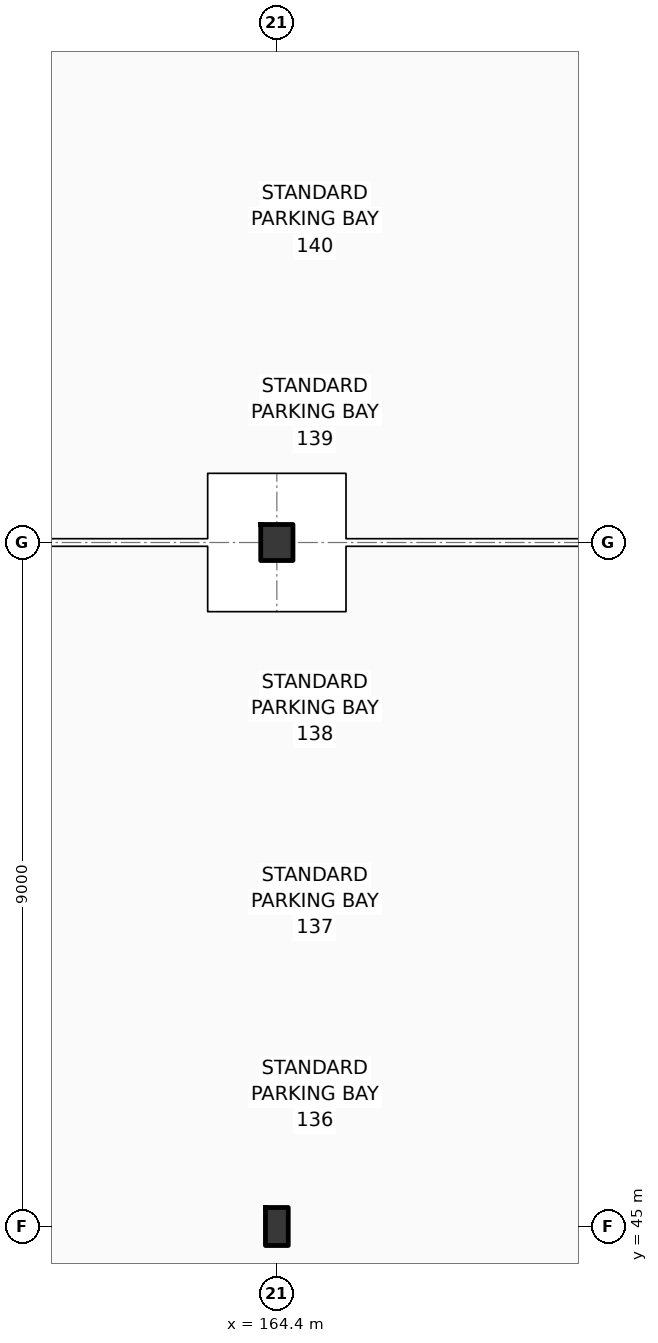
"""IFC4 building model, lengths in metres.
Left out: names, types, materials, properties, quantities, classifications, styles, units other than length and angle.
Written with IfcOpenShell. Run it as: python <this file> out.ifc"""

import sys

from ifc_helpers import new_model, si_unit, direction, frame, origin, origin_2d, place, context, subcontext, project, spatial, i_section, extrude, element, save


model = new_model("IFC4")
c1 = context("Model", 3, precision=1e-05, world=origin(), true_north=direction((0.0, 1.0)))
c2 = subcontext(c1, "Body", "Model", "MODEL_VIEW")
j1 = project(units=[si_unit("LENGTHUNIT", "METRE"), si_unit("PLANEANGLEUNIT", "RADIAN")], contexts=[c1])
p1 = place(None, origin())
s1 = spatial("IfcSite", under=j1, at=p1, CompositionType="ELEMENT")
p2 = place(p1, origin())
s2 = spatial("IfcBuilding", under=s1, at=p2, CompositionType="ELEMENT")
p3 = place(p2, frame((0.0, 0.0, -4.5)))
s3 = spatial("IfcBuildingStorey", under=s2, at=p3, CompositionType="ELEMENT", Elevation=-4.5)
p4 = place(p3, frame((164.4, 54.0, 0.0), z_axis=(0.0, 0.0, 1.0), x_axis=(1.0, 0.0, 0.0)))
e1 = element("IfcColumn", 1, at=p4, inside=s3, PredefinedType="COLUMN", context=c2, shape_type="SweptSolid", body=[
    extrude(i_section(OverallWidth=0.424, OverallDepth=0.474, WebThickness=0.045, FlangeThickness=0.055, FilletRadius=0.015, at=origin_2d()), origin(), (0.0, 0.0, 1.0), 4.5),
])
p5 = place(p3, frame((164.4, 45.0, 0.0), z_axis=(0.0, 0.0, 1.0), x_axis=(1.0, 0.0, 0.0)))
e2 = element("IfcColumn", 2, at=p5, inside=s3, PredefinedType="COLUMN", context=c2, shape_type="SweptSolid", body=[
    extrude(i_section(OverallWidth=0.3, OverallDepth=0.5, WebThickness=0.014, FlangeThickness=0.028, FilletRadius=0.027, at=origin_2d()), origin(), (0.0, 0.0, 1.0), 4.5),
])
save(model, sys.argv[1])
